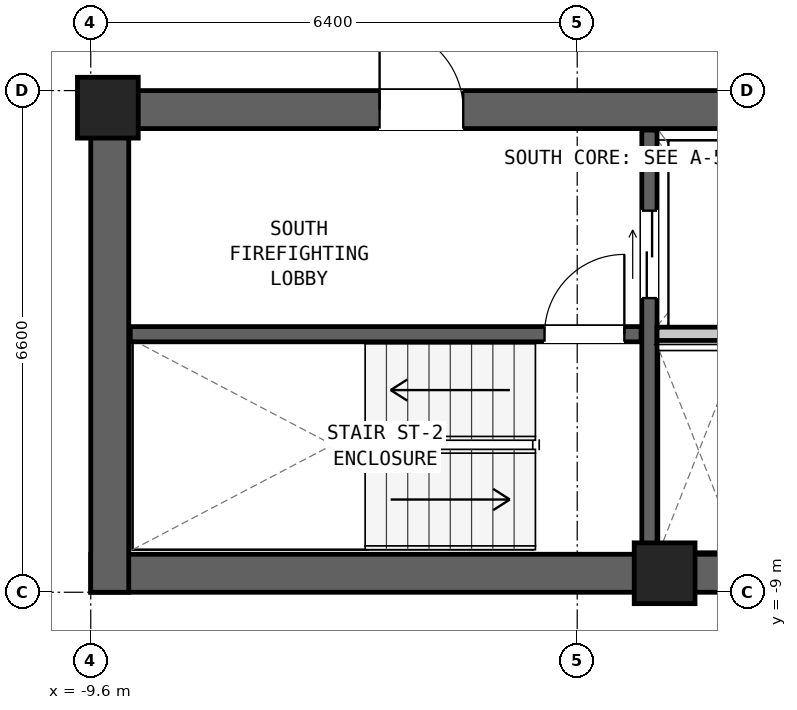
"""IFC4 building model, lengths in metres.
Left out: names, types, materials, properties, quantities, classifications, styles, units other than length and angle.
Written with IfcOpenShell. Run it as: python <this file> out.ifc"""

import sys

from ifc_helpers import new_model, si_unit, direction, frame, frame_2d, origin, origin_2d, place, context, subcontext, project, spatial, rectangle, extrude, element, fill, save


model = new_model("IFC4")
c1 = context("Model", 3, precision=1e-05, world=origin(), true_north=direction((0.0, 1.0)))
c2 = subcontext(c1, "Body", "Model", "MODEL_VIEW")
j1 = project(units=[si_unit("LENGTHUNIT", "METRE"), si_unit("PLANEANGLEUNIT", "RADIAN")], contexts=[c1])
p1 = place(None, origin())
s1 = spatial("IfcSite", under=j1, at=p1, CompositionType="ELEMENT")
p2 = place(p1, origin())
s2 = spatial("IfcBuilding", under=s1, at=p2, CompositionType="ELEMENT")
p3 = place(p2, frame((0.0, 0.0, 137.2)))
s3 = spatial("IfcBuildingStorey", under=s2, at=p3, CompositionType="ELEMENT", Elevation=137.2)
p4 = place(p3, frame((-9.6, -8.75, 0.0), z_axis=(0.0, 0.0, 1.0), x_axis=(1.0, 0.0, 0.0)))
e1 = element("IfcWall", 1, at=p4, inside=s3, PredefinedType="SHEAR", context=c2, shape_type="SweptSolid", body=[
    extrude(rectangle(XDim=19.2, YDim=0.5, at=frame_2d((9.6, 0.0))), origin(), (0.0, 0.0, 1.0), 3.05),
])
p5 = place(p3, frame((-9.6, -2.65, 0.0), z_axis=(0.0, 0.0, 1.0), x_axis=(1.0, 0.0, 0.0)))
e2 = element("IfcWall", 2, at=p5, inside=s3, PredefinedType="SHEAR", context=c2, shape_type="SweptSolid", body=[
    extrude(rectangle(XDim=19.2, YDim=0.5, at=frame_2d((9.6, 0.0))), origin(), (0.0, 0.0, 1.0), 3.05),
])
p6 = place(p5, frame((3.8, 0.0, 0.0)))
e3 = element("IfcOpeningElement", 3, at=p6, cuts=e2, PredefinedType="OPENING", context=c2, shape_type="SweptSolid", body=[
    extrude(rectangle(XDim=1.1, YDim=2.08, at=frame_2d((0.55, 1.04))), frame((0.0, 0.262, 0.0), z_axis=(0.0, -1.0, 0.0), x_axis=(1.0, 0.0, 0.0)), (0.0, 0.0, 1.0), 0.524),
])
p7 = place(p5, frame((12.2, 0.0, 0.0)))
e4 = element("IfcOpeningElement", 4, at=p7, cuts=e2, PredefinedType="OPENING", context=c2, shape_type="SweptSolid", body=[
    extrude(rectangle(XDim=1.6, YDim=2.12, at=frame_2d((0.8, 1.06))), frame((0.0, 0.262, 0.0), z_axis=(0.0, -1.0, 0.0), x_axis=(1.0, 0.0, 0.0)), (0.0, 0.0, 1.0), 0.524),
])
p8 = place(p5, frame((16.5, 0.0, 0.0)))
e5 = element("IfcOpeningElement", 5, at=p8, cuts=e2, PredefinedType="OPENING", context=c2, shape_type="SweptSolid", body=[
    extrude(rectangle(XDim=0.9, YDim=2.05, at=frame_2d((0.45, 1.025))), frame((0.0, 0.262, 0.0), z_axis=(0.0, -1.0, 0.0), x_axis=(1.0, 0.0, 0.0)), (0.0, 0.0, 1.0), 0.524),
])
p9 = place(p3, frame((-9.35, -9.0, 0.0), z_axis=(0.0, 0.0, 1.0), x_axis=(0.0, 1.0, 0.0)))
e6 = element("IfcWall", 6, at=p9, inside=s3, PredefinedType="SHEAR", context=c2, shape_type="SweptSolid", body=[
    extrude(rectangle(XDim=6.6, YDim=0.5, at=frame_2d((3.3, 0.0))), origin(), (0.0, 0.0, 1.0), 3.05),
])
for number, where, z_axis, x_axis in (
    (7, (-9.375, -2.625, 0.0), (0.0, 0.0, 1.0), (1.0, 0.0, 0.0)),
    (8, (-2.05, -8.75, 0.0), (0.0, 0.0, 1.0), (1.0, 0.0, 0.0)),
):
    element("IfcColumn", number, at=place(p3, frame(where, z_axis=z_axis, x_axis=x_axis)), inside=s3, PredefinedType="COLUMN", context=c2, shape_type="SweptSolid", body=[
        extrude(rectangle(XDim=0.8, YDim=0.8, at=origin_2d()), origin(), (0.0, 0.0, 1.0), 3.05),
    ])
p10 = place(p3, frame((-9.08, -5.605, 0.0), z_axis=(0.0, 0.0, 1.0), x_axis=(1.0, 0.0, 0.0)))
e9 = element("IfcWall", 9, at=p10, inside=s3, PredefinedType="SHEAR", context=c2, shape_type="SweptSolid", body=[
    extrude(rectangle(XDim=6.72, YDim=0.2, at=frame_2d((3.36, 0.0))), origin(), (0.0, 0.0, 1.0), 2.83),
])
p11 = place(p10, frame((5.45, 0.0, 0.0)))
e10 = element("IfcOpeningElement", 10, at=p11, cuts=e9, PredefinedType="OPENING", context=c2, shape_type="SweptSolid", body=[
    extrude(rectangle(XDim=1.05, YDim=2.08, at=frame_2d((0.525, 1.04))), frame((0.0, 0.112, 0.0), z_axis=(0.0, -1.0, 0.0), x_axis=(1.0, 0.0, 0.0)), (0.0, 0.0, 1.0), 0.224),
])
p12 = place(p3, frame((-2.25, -8.48, 0.0), z_axis=(0.0, 0.0, 1.0), x_axis=(0.0, 1.0, 0.0)))
e11 = element("IfcWall", 11, at=p12, inside=s3, PredefinedType="SHEAR", context=c2, shape_type="SweptSolid", body=[
    extrude(rectangle(XDim=5.56, YDim=0.2, at=frame_2d((2.78, 0.0))), origin(), (0.0, 0.0, 1.0), 2.83),
])
p13 = place(p12, frame((3.35, 0.0, 0.0)))
e12 = element("IfcOpeningElement", 12, at=p13, cuts=e11, PredefinedType="OPENING", context=c2, shape_type="SweptSolid", body=[
    extrude(rectangle(XDim=1.15, YDim=2.08, at=frame_2d((0.575, 1.04))), frame((0.0, 0.112, 0.0), z_axis=(0.0, -1.0, 0.0), x_axis=(1.0, 0.0, 0.0)), (0.0, 0.0, 1.0), 0.224),
])
p14 = place(p3, frame((-2.15, -5.6, 0.0), z_axis=(0.0, 0.0, 1.0), x_axis=(1.0, 0.0, 0.0)))
e13 = element("IfcWall", 13, at=p14, inside=s3, PredefinedType="PARTITIONING", context=c2, shape_type="SweptSolid", body=[
    extrude(rectangle(XDim=1.97, YDim=0.175, at=frame_2d((0.985, 0.0))), origin(), (0.0, 0.0, 1.0), 2.83),
])
p15 = place(p11, origin())
e14 = element("IfcDoor", 14, at=p15, inside=s3, OperationType="SINGLE_SWING_RIGHT", PredefinedType="DOOR", context=c2, shape_type="SweptSolid", body=[
    extrude(rectangle(XDim=1.05, YDim=2.08, at=frame_2d((0.525, 1.04))), frame((0.0, 0.025, 0.0), z_axis=(0.0, -1.0, 0.0), x_axis=(1.0, 0.0, 0.0)), (0.0, 0.0, 1.0), 0.05),
])
fill(e10, e14)
p16 = place(p6, origin())
e15 = element("IfcDoor", 15, at=p16, inside=s3, OperationType="SINGLE_SWING_LEFT", PredefinedType="DOOR", context=c2, shape_type="SweptSolid", body=[
    extrude(rectangle(XDim=1.1, YDim=2.08, at=frame_2d((0.55, 1.04))), frame((0.0, 0.025, 0.0), z_axis=(0.0, -1.0, 0.0), x_axis=(1.0, 0.0, 0.0)), (0.0, 0.0, 1.0), 0.05),
])
fill(e3, e15)
p17 = place(p13, origin())
e16 = element("IfcDoor", 16, at=p17, inside=s3, OperationType="DOUBLE_DOOR_SLIDING", PredefinedType="DOOR", context=c2, shape_type="SweptSolid", body=[
    extrude(rectangle(XDim=1.15, YDim=2.08, at=frame_2d((0.575, 1.04))), frame((0.0, 0.025, 0.0), z_axis=(0.0, -1.0, 0.0), x_axis=(1.0, 0.0, 0.0)), (0.0, 0.0, 1.0), 0.05),
])
fill(e12, e16)
save(model, sys.argv[1])
